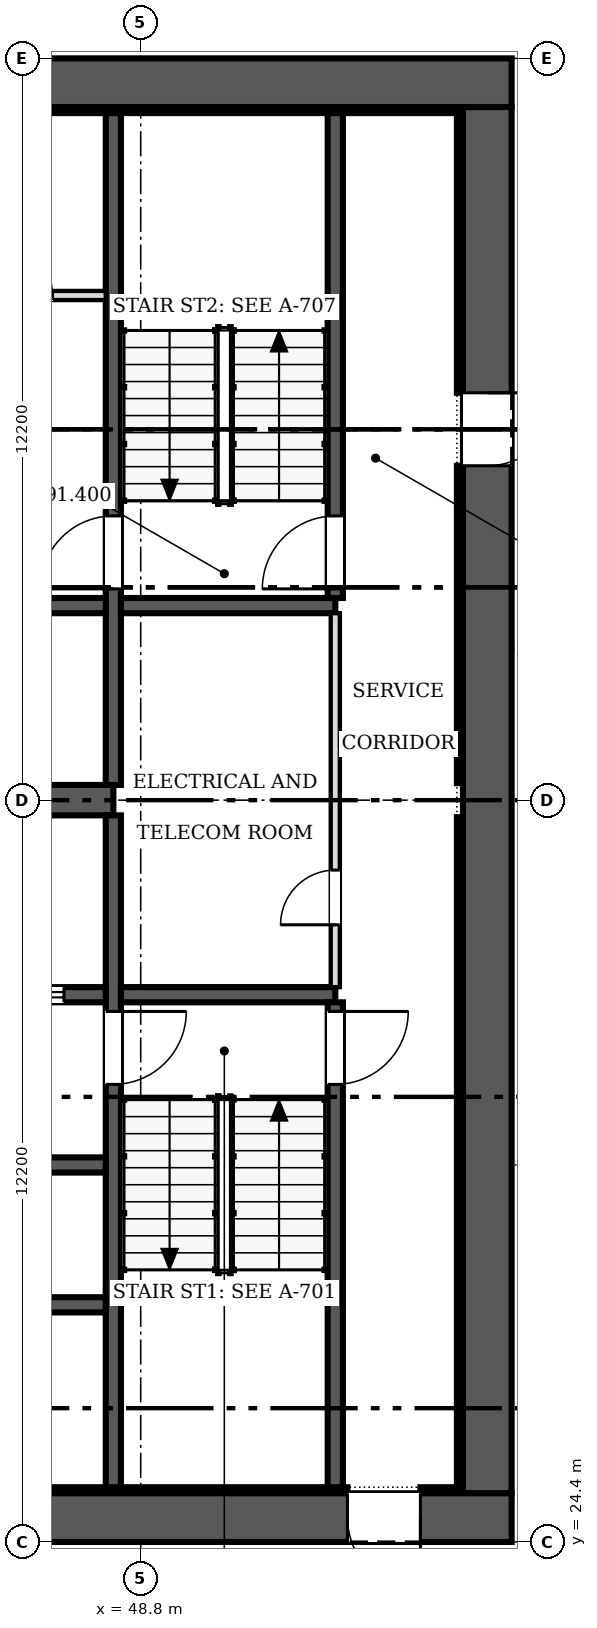
"""IFC4 building model, lengths in metres.
Left out: names, types, materials, properties, quantities, classifications, styles, units other than length and angle.
Written with IfcOpenShell. Run it as: python <this file> out.ifc"""

import sys

from ifc_helpers import new_model, si_unit, direction, frame, frame_2d, origin, place, context, subcontext, project, spatial, rectangle, extrude, source, transform, mapped, element, fill, save


model = new_model("IFC4")
c1 = context("Model", 3, precision=1e-05, world=origin(), true_north=direction((0.0, 1.0)))
c2 = subcontext(c1, "Body", "Model", "MODEL_VIEW")
j1 = project(units=[si_unit("LENGTHUNIT", "METRE"), si_unit("PLANEANGLEUNIT", "RADIAN")], contexts=[c1])
p1 = place(None, origin())
s1 = spatial("IfcSite", under=j1, at=p1, CompositionType="ELEMENT")
p2 = place(p1, origin())
s2 = spatial("IfcBuilding", under=s1, at=p2, CompositionType="ELEMENT")
p3 = place(p2, frame((0.0, 0.0, 91.4)))
s3 = spatial("IfcBuildingStorey", under=s2, at=p3, CompositionType="ELEMENT", Elevation=91.4)
p4 = place(p3, frame((54.9, 24.8, 0.0), z_axis=(0.0, 0.0, 1.0), x_axis=(-1.0, 0.0, 0.0)))
e1 = element("IfcWall", 1, at=p4, inside=s3, PredefinedType="SHEAR", context=c2, shape_type="SweptSolid", body=[
    extrude(rectangle(XDim=24.4, YDim=0.8, at=frame_2d((12.2, 0.0))), origin(), (0.0, 0.0, 1.0), 3.8),
])
m1 = source(origin(), c2, "Body", "SweptSolid", [
    extrude(rectangle(XDim=1.2, YDim=2.1, at=frame_2d((0.6, 1.05))), frame((0.0, 0.41, 0.0), z_axis=(0.0, -1.0, 0.0), x_axis=(1.0, 0.0, 0.0)), (0.0, 0.0, 1.0), 0.82),
])
p5 = place(p4, frame((1.5, 0.0, 0.0)))
e2 = element("IfcOpeningElement", 2, at=p5, cuts=e1, PredefinedType="OPENING", context=c2, shape_type="MappedRepresentation", body=[
    mapped(m1, transform((0.0, 0.0, 0.0), scale=1.0)),
])
p6 = place(p3, frame((30.5, 48.4, 0.0), z_axis=(0.0, 0.0, 1.0), x_axis=(1.0, 0.0, 0.0)))
e3 = element("IfcWall", 3, at=p6, inside=s3, PredefinedType="SHEAR", context=c2, shape_type="SweptSolid", body=[
    extrude(rectangle(XDim=24.4, YDim=0.8, at=frame_2d((12.2, 0.0))), origin(), (0.0, 0.0, 1.0), 3.8),
])
p7 = place(p3, frame((54.5, 48.0, 0.0), z_axis=(0.0, 0.0, 1.0), x_axis=(0.0, -1.0, 0.0)))
e4 = element("IfcWall", 4, at=p7, inside=s3, PredefinedType="SHEAR", context=c2, shape_type="SweptSolid", body=[
    extrude(rectangle(XDim=22.8, YDim=0.8, at=frame_2d((11.4, 0.0))), origin(), (0.0, 0.0, 1.0), 3.8),
])
p8 = place(p7, frame((4.7, 0.0, 0.0)))
e5 = element("IfcOpeningElement", 5, at=p8, cuts=e4, PredefinedType="OPENING", context=c2, shape_type="MappedRepresentation", body=[
    mapped(m1, transform((0.0, 0.0, 0.0), scale=1.0)),
])
p9 = place(p3, frame((31.3, 25.25, 0.0), z_axis=(0.0, 0.0, 1.0), x_axis=(1.0, 0.0, 0.0)))
e6 = element("IfcWall", 6, at=p9, inside=s3, PredefinedType="SOLIDWALL", context=c2, shape_type="SweptSolid", body=[
    extrude(rectangle(XDim=20.9, YDim=0.1, at=frame_2d((10.45, 0.0))), origin(), (0.0, 0.0, 1.0), 3.8),
])
p10 = place(p3, frame((53.4, 25.25, 0.0), z_axis=(0.0, 0.0, 1.0), x_axis=(1.0, 0.0, 0.0)))
e7 = element("IfcWall", 7, at=p10, inside=s3, PredefinedType="SOLIDWALL", context=c2, shape_type="SweptSolid", body=[
    extrude(rectangle(XDim=0.7, YDim=0.1, at=frame_2d((0.35, 0.0))), origin(), (0.0, 0.0, 1.0), 3.8),
])
p11 = place(p3, frame((31.3, 47.95, 0.0), z_axis=(0.0, 0.0, 1.0), x_axis=(1.0, 0.0, 0.0)))
e8 = element("IfcWall", 8, at=p11, inside=s3, PredefinedType="SOLIDWALL", context=c2, shape_type="SweptSolid", body=[
    extrude(rectangle(XDim=22.8, YDim=0.1, at=frame_2d((11.4, 0.0))), origin(), (0.0, 0.0, 1.0), 3.8),
])
p12 = place(p3, frame((54.05, 25.3, 0.0), z_axis=(0.0, 0.0, 1.0), x_axis=(0.0, 1.0, 0.0)))
e9 = element("IfcWall", 9, at=p12, inside=s3, PredefinedType="SOLIDWALL", context=c2, shape_type="SweptSolid", body=[
    extrude(rectangle(XDim=11.02, YDim=0.1, at=frame_2d((5.51, 0.0))), origin(), (0.0, 0.0, 1.0), 3.8),
])
p13 = place(p3, frame((54.05, 36.88, 0.0), z_axis=(0.0, 0.0, 1.0), x_axis=(0.0, 1.0, 0.0)))
e10 = element("IfcWall", 10, at=p13, inside=s3, PredefinedType="SOLIDWALL", context=c2, shape_type="SweptSolid", body=[
    extrude(rectangle(XDim=5.22, YDim=0.1, at=frame_2d((2.61, 0.0))), origin(), (0.0, 0.0, 1.0), 3.8),
])
p14 = place(p3, frame((54.05, 43.3, 0.0), z_axis=(0.0, 0.0, 1.0), x_axis=(0.0, 1.0, 0.0)))
e11 = element("IfcWall", 11, at=p14, inside=s3, PredefinedType="SOLIDWALL", context=c2, shape_type="SweptSolid", body=[
    extrude(rectangle(XDim=4.6, YDim=0.1, at=frame_2d((2.3, 0.0))), origin(), (0.0, 0.0, 1.0), 3.8),
])
p15 = place(p3, frame((31.4, 36.6, 0.0), z_axis=(0.0, 0.0, 1.0), x_axis=(1.0, 0.0, 0.0)))
e12 = element("IfcWall", 12, at=p15, inside=s3, PredefinedType="SHEAR", context=c2, shape_type="SweptSolid", body=[
    extrude(rectangle(XDim=16.95, YDim=0.5, at=frame_2d((8.475, 0.0))), origin(), (0.0, 0.0, 1.0), 3.8),
])
p16 = place(p3, frame((48.35, 36.35, 0.0), z_axis=(0.0, 0.0, 1.0), x_axis=(0.0, -1.0, 0.0)))
e13 = element("IfcWall", 13, at=p16, inside=s3, PredefinedType="SOLIDWALL", context=c2, shape_type="SweptSolid", body=[
    extrude(rectangle(XDim=11.05, YDim=0.25, at=frame_2d((5.525, 0.0))), origin(), (0.0, 0.0, 1.0), 3.8),
])
m2 = source(origin(), c2, "Body", "SweptSolid", [
    extrude(rectangle(XDim=1.2, YDim=2.1, at=frame_2d((0.6, 1.05))), frame((0.0, 0.135, 0.0), z_axis=(0.0, -1.0, 0.0), x_axis=(1.0, 0.0, 0.0)), (0.0, 0.0, 1.0), 0.27),
])
p17 = place(p16, frame((3.225, 0.0, 0.0)))
e14 = element("IfcOpeningElement", 14, at=p17, cuts=e13, PredefinedType="OPENING", context=c2, shape_type="MappedRepresentation", body=[
    mapped(m2, transform((0.0, 0.0, 0.0), scale=1.0)),
])
p18 = place(p3, frame((48.35, 47.9, 0.0), z_axis=(0.0, 0.0, 1.0), x_axis=(0.0, -1.0, 0.0)))
e15 = element("IfcWall", 15, at=p18, inside=s3, PredefinedType="SOLIDWALL", context=c2, shape_type="SweptSolid", body=[
    extrude(rectangle(XDim=11.05, YDim=0.25, at=frame_2d((5.525, 0.0))), origin(), (0.0, 0.0, 1.0), 3.8),
])
p19 = place(p18, frame((6.625, 0.0, 0.0)))
e16 = element("IfcOpeningElement", 16, at=p19, cuts=e15, PredefinedType="OPENING", context=c2, shape_type="MappedRepresentation", body=[
    mapped(m2, transform((0.0, 0.0, 0.0), scale=1.0)),
])
p20 = place(p3, frame((48.225, 33.4, 0.0), z_axis=(0.0, 0.0, 1.0), x_axis=(-1.0, 0.0, 0.0)))
e17 = element("IfcWall", 17, at=p20, inside=s3, PredefinedType="SOLIDWALL", context=c2, shape_type="SweptSolid", body=[
    extrude(rectangle(XDim=5.275, YDim=0.25, at=frame_2d((2.638, 0.0))), origin(), (0.0, 0.0, 1.0), 3.8),
])
p21 = place(p20, frame((3.512, 0.0, 0.0)))
e18 = element("IfcOpeningElement", 18, at=p21, cuts=e17, PredefinedType="OPENING", context=c2, shape_type="MappedRepresentation", body=[
    mapped(m2, transform((0.0, 0.0, 0.0), scale=1.0)),
])
p22 = place(p20, frame((0.688, 0.0, 0.0)))
e19 = element("IfcOpeningElement", 19, at=p22, cuts=e17, PredefinedType="OPENING", context=c2, shape_type="MappedRepresentation", body=[
    mapped(m2, transform((0.0, 0.0, 0.0), scale=1.0)),
])
p23 = place(p3, frame((48.475, 33.4, 0.0), z_axis=(0.0, 0.0, 1.0), x_axis=(1.0, 0.0, 0.0)))
e20 = element("IfcWall", 20, at=p23, inside=s3, PredefinedType="SOLIDWALL", context=c2, shape_type="SweptSolid", body=[
    extrude(rectangle(XDim=3.525, YDim=0.25, at=frame_2d((1.762, 0.0))), origin(), (0.0, 0.0, 1.0), 3.8),
])
for number, where, z_axis, x_axis in (
    (21, (42.95, 28.3, 0.0), (0.0, 0.0, 1.0), (1.0, 0.0, 0.0)),
    (22, (42.95, 39.8, 0.0), (0.0, 0.0, 1.0), (1.0, 0.0, 0.0)),
):
    element("IfcWall", number, at=place(p3, frame(where, z_axis=z_axis, x_axis=x_axis)), inside=s3, PredefinedType="SOLIDWALL", context=c2, shape_type="SweptSolid", body=[
        extrude(rectangle(XDim=5.275, YDim=0.25, at=frame_2d((2.638, 0.0))), origin(), (0.0, 0.0, 1.0), 3.8),
    ])
p24 = place(p3, frame((48.475, 39.8, 0.0), z_axis=(0.0, 0.0, 1.0), x_axis=(1.0, 0.0, 0.0)))
e23 = element("IfcWall", 23, at=p24, inside=s3, PredefinedType="SOLIDWALL", context=c2, shape_type="SweptSolid", body=[
    extrude(rectangle(XDim=3.525, YDim=0.25, at=frame_2d((1.762, 0.0))), origin(), (0.0, 0.0, 1.0), 3.8),
])
p25 = place(p3, frame((52.0, 25.3, 0.0), z_axis=(0.0, 0.0, 1.0), x_axis=(0.0, 1.0, 0.0)))
e24 = element("IfcWall", 24, at=p25, inside=s3, PredefinedType="SOLIDWALL", context=c2, shape_type="SweptSolid", body=[
    extrude(rectangle(XDim=7.975, YDim=0.25, at=frame_2d((3.987, 0.0))), origin(), (0.0, 0.0, 1.0), 3.8),
])
p26 = place(p25, frame((6.625, 0.0, 0.0)))
e25 = element("IfcOpeningElement", 25, at=p26, cuts=e24, PredefinedType="OPENING", context=c2, shape_type="MappedRepresentation", body=[
    mapped(m2, transform((0.0, 0.0, 0.0), scale=1.0)),
])
p27 = place(p3, frame((52.0, 39.925, 0.0), z_axis=(0.0, 0.0, 1.0), x_axis=(0.0, 1.0, 0.0)))
e26 = element("IfcWall", 26, at=p27, inside=s3, PredefinedType="SOLIDWALL", context=c2, shape_type="SweptSolid", body=[
    extrude(rectangle(XDim=7.975, YDim=0.25, at=frame_2d((3.987, 0.0))), origin(), (0.0, 0.0, 1.0), 3.8),
])
p28 = place(p27, frame((0.15, 0.0, 0.0)))
e27 = element("IfcOpeningElement", 27, at=p28, cuts=e26, PredefinedType="OPENING", context=c2, shape_type="MappedRepresentation", body=[
    mapped(m2, transform((0.0, 0.0, 0.0), scale=1.0)),
])
p29 = place(p3, frame((42.95, 30.6, 0.0), z_axis=(0.0, 0.0, 1.0), x_axis=(1.0, 0.0, 0.0)))
e28 = element("IfcWall", 28, at=p29, inside=s3, PredefinedType="SOLIDWALL", context=c2, shape_type="SweptSolid", body=[
    extrude(rectangle(XDim=5.275, YDim=0.25, at=frame_2d((2.638, 0.0))), origin(), (0.0, 0.0, 1.0), 3.8),
])
p30 = place(p3, frame((52.0, 33.525, 0.0), z_axis=(0.0, 0.0, 1.0), x_axis=(0.0, 1.0, 0.0)))
e29 = element("IfcWall", 29, at=p30, inside=s3, PredefinedType="PARTITIONING", context=c2, shape_type="SweptSolid", body=[
    extrude(rectangle(XDim=6.15, YDim=0.15, at=frame_2d((3.075, 0.0))), origin(), (0.0, 0.0, 1.0), 3.6),
])
m3 = source(origin(), c2, "Body", "SweptSolid", [
    extrude(rectangle(XDim=0.9, YDim=2.1, at=frame_2d((0.45, 1.05))), frame((0.0, 0.085, 0.0), z_axis=(0.0, -1.0, 0.0), x_axis=(1.0, 0.0, 0.0)), (0.0, 0.0, 1.0), 0.17),
])
p31 = place(p30, frame((1.025, 0.0, 0.0)))
e30 = element("IfcOpeningElement", 30, at=p31, cuts=e29, PredefinedType="OPENING", context=c2, shape_type="MappedRepresentation", body=[
    mapped(m3, transform((0.0, 0.0, 0.0), scale=1.0)),
])
p32 = place(p3, frame((45.65, 44.9, 0.0), z_axis=(0.0, 0.0, 1.0), x_axis=(1.0, 0.0, 0.0)))
e31 = element("IfcWall", 31, at=p32, inside=s3, PredefinedType="PARTITIONING", context=c2, shape_type="SweptSolid", body=[
    extrude(rectangle(XDim=2.575, YDim=0.15, at=frame_2d((1.288, 0.0))), origin(), (0.0, 0.0, 1.0), 3.6),
])
p33 = place(p32, frame((0.8, 0.0, 0.0)))
e32 = element("IfcOpeningElement", 32, at=p33, cuts=e31, PredefinedType="OPENING", context=c2, shape_type="MappedRepresentation", body=[
    mapped(m3, transform((0.0, 0.0, 0.0), scale=1.0)),
])
m4 = source(origin(), c2, "Body", "SweptSolid", [
    extrude(rectangle(XDim=1.2, YDim=2.1, at=frame_2d((0.6, 1.05))), frame((0.0, 0.025, 0.0), z_axis=(0.0, -1.0, 0.0), x_axis=(1.0, 0.0, 0.0)), (0.0, 0.0, 1.0), 0.05),
])
p34 = place(p5, origin())
e33 = element("IfcDoor", 33, at=p34, inside=s3, OperationType="SINGLE_SWING_LEFT", PredefinedType="DOOR", context=c2, shape_type="MappedRepresentation", body=[
    mapped(m4, transform((0.0, 0.0, 0.0), scale=1.0)),
])
fill(e2, e33)
p35 = place(p8, origin())
e34 = element("IfcDoor", 34, at=p35, inside=s3, OperationType="SINGLE_SWING_LEFT", PredefinedType="DOOR", context=c2, shape_type="MappedRepresentation", body=[
    mapped(m4, transform((0.0, 0.0, 0.0), scale=1.0)),
])
fill(e5, e34)
p36 = place(p17, origin())
e35 = element("IfcDoor", 35, at=p36, inside=s3, OperationType="SINGLE_SWING_LEFT", PredefinedType="DOOR", context=c2, shape_type="MappedRepresentation", body=[
    mapped(m4, transform((0.0, 0.0, 0.0), scale=1.0)),
])
fill(e14, e35)
p37 = place(p19, origin())
e36 = element("IfcDoor", 36, at=p37, inside=s3, OperationType="SINGLE_SWING_RIGHT", PredefinedType="DOOR", context=c2, shape_type="MappedRepresentation", body=[
    mapped(m4, transform((0.0, 0.0, 0.0), scale=1.0)),
])
fill(e16, e36)
p38 = place(p22, origin())
e37 = element("IfcDoor", 37, at=p38, inside=s3, OperationType="DOUBLE_DOOR_SLIDING", PredefinedType="DOOR", context=c2, shape_type="MappedRepresentation", body=[
    mapped(m4, transform((0.0, 0.0, 0.0), scale=1.0)),
])
fill(e19, e37)
p39 = place(p26, origin())
e38 = element("IfcDoor", 38, at=p39, inside=s3, OperationType="SINGLE_SWING_RIGHT", PredefinedType="DOOR", context=c2, shape_type="MappedRepresentation", body=[
    mapped(m4, transform((0.0, 0.0, 0.0), scale=1.0)),
])
fill(e25, e38)
p40 = place(p28, origin())
e39 = element("IfcDoor", 39, at=p40, inside=s3, OperationType="SINGLE_SWING_LEFT", PredefinedType="DOOR", context=c2, shape_type="MappedRepresentation", body=[
    mapped(m4, transform((0.0, 0.0, 0.0), scale=1.0)),
])
fill(e27, e39)
m5 = source(origin(), c2, "Body", "SweptSolid", [
    extrude(rectangle(XDim=0.9, YDim=2.1, at=frame_2d((0.45, 1.05))), frame((0.0, 0.025, 0.0), z_axis=(0.0, -1.0, 0.0), x_axis=(1.0, 0.0, 0.0)), (0.0, 0.0, 1.0), 0.05),
])
p41 = place(p31, origin())
e40 = element("IfcDoor", 40, at=p41, inside=s3, OperationType="SINGLE_SWING_LEFT", PredefinedType="DOOR", context=c2, shape_type="MappedRepresentation", body=[
    mapped(m5, transform((0.0, 0.0, 0.0), scale=1.0)),
])
fill(e30, e40)
save(model, sys.argv[1])
